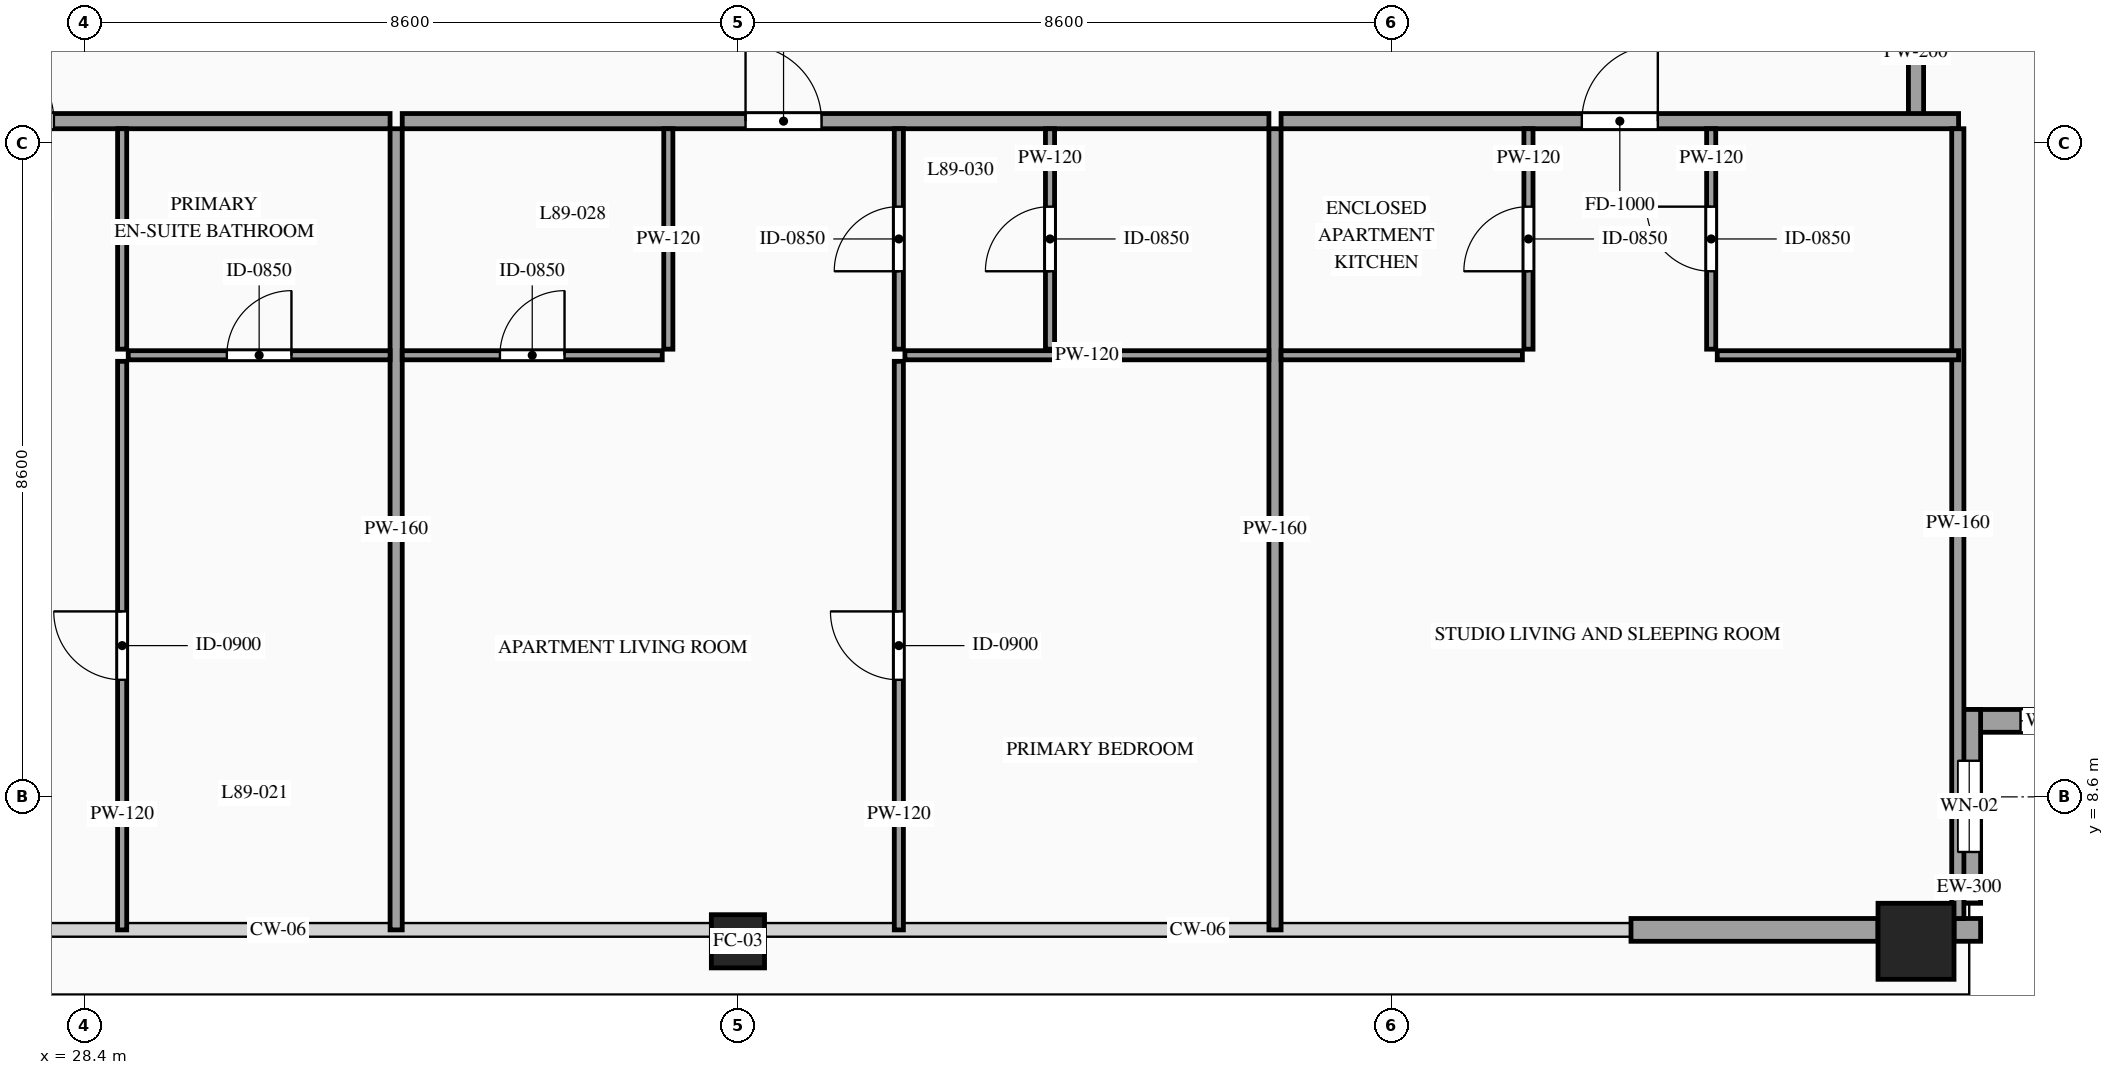
"""IFC4 building model, lengths in metres.
Left out: names, types, materials, properties, quantities, classifications, styles, units other than length and angle.
Written with IfcOpenShell. Run it as: python <this file> out.ifc"""

import sys

from ifc_helpers import new_model, si_unit, direction, frame, frame_2d, origin, origin_2d, place, context, subcontext, project, spatial, rectangle, hollow_rectangle, extrude, source, transform, mapped, element, fill, save


model = new_model("IFC4")
c1 = context("Model", 3, precision=1e-05, world=origin(), true_north=direction((0.0, 1.0)))
c2 = subcontext(c1, "Body", "Model", "MODEL_VIEW")
j1 = project(units=[si_unit("LENGTHUNIT", "METRE"), si_unit("PLANEANGLEUNIT", "RADIAN")], contexts=[c1])
p1 = place(None, origin())
s1 = spatial("IfcSite", under=j1, at=p1, CompositionType="ELEMENT")
p2 = place(p1, origin())
s2 = spatial("IfcBuilding", under=s1, at=p2, CompositionType="ELEMENT")
p3 = place(p2, frame((0.0, 0.0, 332.2)))
s3 = spatial("IfcBuildingStorey", under=s2, at=p3, CompositionType="ELEMENT", Elevation=332.2)
m1 = source(origin(), c2, "Body", "SweptSolid", [
    extrude(hollow_rectangle(XDim=0.7, YDim=0.7, WallThickness=0.032, at=origin_2d()), origin(), (0.0, 0.0, 1.0), 3.5),
])
p4 = place(p3, frame((37.0, 6.7, 0.0), z_axis=(0.0, 0.0, 1.0), x_axis=(1.0, 0.0, 0.0)))
e1 = element("IfcColumn", 1, at=p4, inside=s3, PredefinedType="COLUMN", context=c2, shape_type="MappedRepresentation", body=[
    mapped(m1, transform((0.0, 0.0, 0.0), scale=1.0)),
])
m2 = source(origin(), c2, "Body", "SweptSolid", [
    extrude(hollow_rectangle(XDim=1.0, YDim=1.0, WallThickness=0.048, at=origin_2d()), origin(), (0.0, 0.0, 1.0), 3.5),
])
p5 = place(p3, frame((52.5, 6.7, 0.0), z_axis=(0.0, 0.0, 1.0), x_axis=(1.0, 0.0, 0.0)))
e2 = element("IfcColumn", 2, at=p5, inside=s3, PredefinedType="COLUMN", context=c2, shape_type="MappedRepresentation", body=[
    mapped(m2, transform((0.0, 0.0, 0.0), scale=1.0)),
])
p6 = place(p3, frame((53.05, 9.6, 0.0), z_axis=(0.0, 0.0, 1.0), x_axis=(1.0, 0.0, 0.0)))
e3 = element("IfcWall", 3, at=p6, inside=s3, PredefinedType="SOLIDWALL", context=c2, shape_type="SweptSolid", body=[
    extrude(rectangle(XDim=2.55, YDim=0.3, at=frame_2d((1.275, 0.0))), origin(), (0.0, 0.0, 1.0), 3.28),
])
p7 = place(p6, frame((0.825, 0.0, 0.85)))
e4 = element("IfcOpeningElement", 4, at=p7, cuts=e3, PredefinedType="OPENING", context=c2, shape_type="SweptSolid", body=[
    extrude(rectangle(XDim=0.9, YDim=1.5, at=frame_2d((0.45, 0.75))), frame((0.0, 0.165, 0.0), z_axis=(0.0, -1.0, 0.0), x_axis=(1.0, 0.0, 0.0)), (0.0, 0.0, 1.0), 0.33),
])
p8 = place(p3, frame((53.2, 7.2, 0.0), z_axis=(0.0, 0.0, 1.0), x_axis=(0.0, 1.0, 0.0)))
e5 = element("IfcWall", 5, at=p8, inside=s3, PredefinedType="SOLIDWALL", context=c2, shape_type="SweptSolid", body=[
    extrude(rectangle(XDim=2.55, YDim=0.3, at=frame_2d((1.275, 0.0))), origin(), (0.0, 0.0, 1.0), 3.28),
])
p9 = place(p8, frame((0.675, 0.0, 0.85)))
e6 = element("IfcOpeningElement", 6, at=p9, cuts=e5, PredefinedType="OPENING", context=c2, shape_type="SweptSolid", body=[
    extrude(rectangle(XDim=1.2, YDim=2.1, at=frame_2d((0.6, 1.05))), frame((0.0, 0.165, 0.0), z_axis=(0.0, -1.0, 0.0), x_axis=(1.0, 0.0, 0.0)), (0.0, 0.0, 1.0), 0.33),
])
m3 = source(origin(), c2, "Body", "SweptSolid", [
    extrude(rectangle(XDim=0.35, YDim=0.3, at=frame_2d((0.175, 0.0))), origin(), (0.0, 0.0, 1.0), 3.28),
])
p10 = place(p3, frame((53.0, 6.85, 0.0), z_axis=(0.0, 0.0, 1.0), x_axis=(1.0, 0.0, 0.0)))
e7 = element("IfcWall", 7, at=p10, inside=s3, PredefinedType="SOLIDWALL", context=c2, shape_type="MappedRepresentation", body=[
    mapped(m3, transform((0.0, 0.0, 0.0), scale=1.0)),
])
m4 = source(origin(), c2, "Body", "SweptSolid", [
    extrude(rectangle(XDim=3.25, YDim=0.3, at=frame_2d((1.625, 0.0))), origin(), (0.0, 0.0, 1.0), 2.885),
])
p11 = place(p3, frame((48.75, 6.85, 0.0), z_axis=(0.0, 0.0, 1.0), x_axis=(1.0, 0.0, 0.0)))
e8 = element("IfcWall", 8, at=p11, inside=s3, PredefinedType="SOLIDWALL", context=c2, shape_type="MappedRepresentation", body=[
    mapped(m4, transform((0.0, 0.0, 0.0), scale=1.0)),
])
m5 = source(origin(), c2, "Body", "SweptSolid", [
    extrude(rectangle(XDim=1.7, YDim=0.2, at=frame_2d((0.85, 0.0))), origin(), (0.0, 0.0, 1.0), 3.28),
])
p12 = place(p3, frame((52.5, 17.55, 0.0), z_axis=(0.0, 0.0, 1.0), x_axis=(0.0, 1.0, 0.0)))
e9 = element("IfcWall", 9, at=p12, inside=s3, PredefinedType="PARTITIONING", context=c2, shape_type="MappedRepresentation", body=[
    mapped(m5, transform((0.0, 0.0, 0.0), scale=1.0)),
])
p13 = place(p3, frame((20.94, 17.49, 0.0), z_axis=(0.0, 0.0, 1.0), x_axis=(1.0, 0.0, 0.0)))
e10 = element("IfcWall", 10, at=p13, inside=s3, PredefinedType="PARTITIONING", context=c2, shape_type="SweptSolid", body=[
    extrude(rectangle(XDim=11.483, YDim=0.2, at=frame_2d((5.742, 0.0))), origin(), (0.0, 0.0, 1.0), 3.28),
])
p14 = place(p13, frame((6.06, 0.0, 0.0)))
e11 = element("IfcOpeningElement", 11, at=p14, cuts=e10, PredefinedType="OPENING", context=c2, shape_type="SweptSolid", body=[
    extrude(rectangle(XDim=1.0, YDim=2.2, at=frame_2d((0.5, 1.1))), frame((0.0, 0.115, 0.0), z_axis=(0.0, -1.0, 0.0), x_axis=(1.0, 0.0, 0.0)), (0.0, 0.0, 1.0), 0.23),
])
m6 = source(origin(), c2, "Body", "SweptSolid", [
    extrude(rectangle(XDim=10.54, YDim=0.16, at=frame_2d((5.27, 0.0))), origin(), (0.0, 0.0, 1.0), 3.28),
])
p15 = place(p3, frame((32.503, 6.85, 0.0), z_axis=(0.0, 0.0, 1.0), x_axis=(0.0, 1.0, 0.0)))
e12 = element("IfcWall", 12, at=p15, inside=s3, PredefinedType="PARTITIONING", context=c2, shape_type="MappedRepresentation", body=[
    mapped(m6, transform((0.0, 0.0, 0.0), scale=1.0)),
])
p16 = place(p3, frame((28.978, 14.41, 0.0), z_axis=(0.0, 0.0, 1.0), x_axis=(1.0, 0.0, 0.0)))
e13 = element("IfcWall", 13, at=p16, inside=s3, PredefinedType="PARTITIONING", context=c2, shape_type="SweptSolid", body=[
    extrude(rectangle(XDim=3.445, YDim=0.12, at=frame_2d((1.723, 0.0))), origin(), (0.0, 0.0, 1.0), 3.28),
])
p17 = place(p16, frame((1.298, 0.0, 0.0)))
e14 = element("IfcOpeningElement", 14, at=p17, cuts=e13, PredefinedType="OPENING", context=c2, shape_type="SweptSolid", body=[
    extrude(rectangle(XDim=0.85, YDim=2.1, at=frame_2d((0.425, 1.05))), frame((0.0, 0.075, 0.0), z_axis=(0.0, -1.0, 0.0), x_axis=(1.0, 0.0, 0.0)), (0.0, 0.0, 1.0), 0.15),
])
m7 = source(origin(), c2, "Body", "SweptSolid", [
    extrude(rectangle(XDim=2.9, YDim=0.12, at=frame_2d((1.45, 0.0))), origin(), (0.0, 0.0, 1.0), 3.28),
])
p18 = place(p3, frame((28.898, 14.49, 0.0), z_axis=(0.0, 0.0, 1.0), x_axis=(0.0, 1.0, 0.0)))
e15 = element("IfcWall", 15, at=p18, inside=s3, PredefinedType="PARTITIONING", context=c2, shape_type="MappedRepresentation", body=[
    mapped(m7, transform((0.0, 0.0, 0.0), scale=1.0)),
])
p19 = place(p3, frame((28.898, 6.85, 0.0), z_axis=(0.0, 0.0, 1.0), x_axis=(0.0, 1.0, 0.0)))
e16 = element("IfcWall", 16, at=p19, inside=s3, PredefinedType="PARTITIONING", context=c2, shape_type="SweptSolid", body=[
    extrude(rectangle(XDim=7.48, YDim=0.12, at=frame_2d((3.74, 0.0))), origin(), (0.0, 0.0, 1.0), 3.28),
])
p20 = place(p19, frame((3.29, 0.0, 0.0)))
e17 = element("IfcOpeningElement", 17, at=p20, cuts=e16, PredefinedType="OPENING", context=c2, shape_type="SweptSolid", body=[
    extrude(rectangle(XDim=0.9, YDim=2.15, at=frame_2d((0.45, 1.075))), frame((0.0, 0.075, 0.0), z_axis=(0.0, -1.0, 0.0), x_axis=(1.0, 0.0, 0.0)), (0.0, 0.0, 1.0), 0.15),
])
p21 = place(p3, frame((32.583, 17.49, 0.0), z_axis=(0.0, 0.0, 1.0), x_axis=(1.0, 0.0, 0.0)))
e18 = element("IfcWall", 18, at=p21, inside=s3, PredefinedType="PARTITIONING", context=c2, shape_type="SweptSolid", body=[
    extrude(rectangle(XDim=11.403, YDim=0.2, at=frame_2d((5.702, 0.0))), origin(), (0.0, 0.0, 1.0), 3.28),
])
p22 = place(p21, frame((4.517, 0.0, 0.0)))
e19 = element("IfcOpeningElement", 19, at=p22, cuts=e18, PredefinedType="OPENING", context=c2, shape_type="SweptSolid", body=[
    extrude(rectangle(XDim=1.0, YDim=2.2, at=frame_2d((0.5, 1.1))), frame((0.0, 0.115, 0.0), z_axis=(0.0, -1.0, 0.0), x_axis=(1.0, 0.0, 0.0)), (0.0, 0.0, 1.0), 0.23),
])
p23 = place(p3, frame((44.066, 6.85, 0.0), z_axis=(0.0, 0.0, 1.0), x_axis=(0.0, 1.0, 0.0)))
e20 = element("IfcWall", 20, at=p23, inside=s3, PredefinedType="PARTITIONING", context=c2, shape_type="MappedRepresentation", body=[
    mapped(m6, transform((0.0, 0.0, 0.0), scale=1.0)),
])
p24 = place(p3, frame((32.583, 14.41, 0.0), z_axis=(0.0, 0.0, 1.0), x_axis=(1.0, 0.0, 0.0)))
e21 = element("IfcWall", 21, at=p24, inside=s3, PredefinedType="PARTITIONING", context=c2, shape_type="SweptSolid", body=[
    extrude(rectangle(XDim=3.421, YDim=0.12, at=frame_2d((1.71, 0.0))), origin(), (0.0, 0.0, 1.0), 3.28),
])
p25 = place(p24, frame((1.285, 0.0, 0.0)))
e22 = element("IfcOpeningElement", 22, at=p25, cuts=e21, PredefinedType="OPENING", context=c2, shape_type="SweptSolid", body=[
    extrude(rectangle(XDim=0.85, YDim=2.1, at=frame_2d((0.425, 1.05))), frame((0.0, 0.075, 0.0), z_axis=(0.0, -1.0, 0.0), x_axis=(1.0, 0.0, 0.0)), (0.0, 0.0, 1.0), 0.15),
])
p26 = place(p3, frame((36.084, 14.49, 0.0), z_axis=(0.0, 0.0, 1.0), x_axis=(0.0, 1.0, 0.0)))
e23 = element("IfcWall", 23, at=p26, inside=s3, PredefinedType="PARTITIONING", context=c2, shape_type="MappedRepresentation", body=[
    mapped(m7, transform((0.0, 0.0, 0.0), scale=1.0)),
])
p27 = place(p3, frame((41.106, 14.49, 0.0), z_axis=(0.0, 0.0, 1.0), x_axis=(0.0, 1.0, 0.0)))
e24 = element("IfcWall", 24, at=p27, inside=s3, PredefinedType="PARTITIONING", context=c2, shape_type="SweptSolid", body=[
    extrude(rectangle(XDim=2.9, YDim=0.12, at=frame_2d((1.45, 0.0))), origin(), (0.0, 0.0, 1.0), 3.28),
])
p28 = place(p27, frame((1.025, 0.0, 0.0)))
e25 = element("IfcOpeningElement", 25, at=p28, cuts=e24, PredefinedType="OPENING", context=c2, shape_type="SweptSolid", body=[
    extrude(rectangle(XDim=0.85, YDim=2.1, at=frame_2d((0.425, 1.05))), frame((0.0, 0.075, 0.0), z_axis=(0.0, -1.0, 0.0), x_axis=(1.0, 0.0, 0.0)), (0.0, 0.0, 1.0), 0.15),
])
m8 = source(origin(), c2, "Body", "SweptSolid", [
    extrude(rectangle(XDim=4.789, YDim=0.12, at=frame_2d((2.395, 0.0))), origin(), (0.0, 0.0, 1.0), 3.28),
])
p29 = place(p3, frame((39.197, 14.41, 0.0), z_axis=(0.0, 0.0, 1.0), x_axis=(1.0, 0.0, 0.0)))
e26 = element("IfcWall", 26, at=p29, inside=s3, PredefinedType="PARTITIONING", context=c2, shape_type="MappedRepresentation", body=[
    mapped(m8, transform((0.0, 0.0, 0.0), scale=1.0)),
])
p30 = place(p3, frame((39.117, 6.85, 0.0), z_axis=(0.0, 0.0, 1.0), x_axis=(0.0, 1.0, 0.0)))
e27 = element("IfcWall", 27, at=p30, inside=s3, PredefinedType="PARTITIONING", context=c2, shape_type="SweptSolid", body=[
    extrude(rectangle(XDim=7.48, YDim=0.12, at=frame_2d((3.74, 0.0))), origin(), (0.0, 0.0, 1.0), 3.28),
])
p31 = place(p30, frame((3.29, 0.0, 0.0)))
e28 = element("IfcOpeningElement", 28, at=p31, cuts=e27, PredefinedType="OPENING", context=c2, shape_type="SweptSolid", body=[
    extrude(rectangle(XDim=0.9, YDim=2.15, at=frame_2d((0.45, 1.075))), frame((0.0, 0.075, 0.0), z_axis=(0.0, -1.0, 0.0), x_axis=(1.0, 0.0, 0.0)), (0.0, 0.0, 1.0), 0.15),
])
p32 = place(p3, frame((39.117, 14.49, 0.0), z_axis=(0.0, 0.0, 1.0), x_axis=(0.0, 1.0, 0.0)))
e29 = element("IfcWall", 29, at=p32, inside=s3, PredefinedType="PARTITIONING", context=c2, shape_type="SweptSolid", body=[
    extrude(rectangle(XDim=2.9, YDim=0.12, at=frame_2d((1.45, 0.0))), origin(), (0.0, 0.0, 1.0), 3.28),
])
p33 = place(p32, frame((1.025, 0.0, 0.0)))
e30 = element("IfcOpeningElement", 30, at=p33, cuts=e29, PredefinedType="OPENING", context=c2, shape_type="SweptSolid", body=[
    extrude(rectangle(XDim=0.85, YDim=2.1, at=frame_2d((0.425, 1.05))), frame((0.0, 0.075, 0.0), z_axis=(0.0, -1.0, 0.0), x_axis=(1.0, 0.0, 0.0)), (0.0, 0.0, 1.0), 0.15),
])
p34 = place(p3, frame((44.146, 17.49, 0.0), z_axis=(0.0, 0.0, 1.0), x_axis=(1.0, 0.0, 0.0)))
e31 = element("IfcWall", 31, at=p34, inside=s3, PredefinedType="PARTITIONING", context=c2, shape_type="SweptSolid", body=[
    extrude(rectangle(XDim=8.914, YDim=0.2, at=frame_2d((4.457, 0.0))), origin(), (0.0, 0.0, 1.0), 3.28),
])
p35 = place(p34, frame((3.957, 0.0, 0.0)))
e32 = element("IfcOpeningElement", 32, at=p35, cuts=e31, PredefinedType="OPENING", context=c2, shape_type="SweptSolid", body=[
    extrude(rectangle(XDim=1.0, YDim=2.2, at=frame_2d((0.5, 1.1))), frame((0.0, 0.115, 0.0), z_axis=(0.0, -1.0, 0.0), x_axis=(1.0, 0.0, 0.0)), (0.0, 0.0, 1.0), 0.23),
])
m9 = source(origin(), c2, "Body", "SweptSolid", [
    extrude(rectangle(XDim=10.39, YDim=0.16, at=frame_2d((5.195, 0.0))), origin(), (0.0, 0.0, 1.0), 3.28),
])
p36 = place(p3, frame((53.05, 7.0, 0.0), z_axis=(0.0, 0.0, 1.0), x_axis=(0.0, 1.0, 0.0)))
e33 = element("IfcWall", 33, at=p36, inside=s3, PredefinedType="PARTITIONING", context=c2, shape_type="MappedRepresentation", body=[
    mapped(m9, transform((0.0, 0.0, 0.0), scale=1.0)),
])
m10 = source(origin(), c2, "Body", "SweptSolid", [
    extrude(rectangle(XDim=3.175, YDim=0.12, at=frame_2d((1.587, 0.0))), origin(), (0.0, 0.0, 1.0), 3.28),
])
p37 = place(p3, frame((44.146, 14.41, 0.0), z_axis=(0.0, 0.0, 1.0), x_axis=(1.0, 0.0, 0.0)))
e34 = element("IfcWall", 34, at=p37, inside=s3, PredefinedType="PARTITIONING", context=c2, shape_type="MappedRepresentation", body=[
    mapped(m10, transform((0.0, 0.0, 0.0), scale=1.0)),
])
p38 = place(p3, frame((47.401, 14.49, 0.0), z_axis=(0.0, 0.0, 1.0), x_axis=(0.0, 1.0, 0.0)))
e35 = element("IfcWall", 35, at=p38, inside=s3, PredefinedType="PARTITIONING", context=c2, shape_type="SweptSolid", body=[
    extrude(rectangle(XDim=2.9, YDim=0.12, at=frame_2d((1.45, 0.0))), origin(), (0.0, 0.0, 1.0), 3.28),
])
p39 = place(p38, frame((1.025, 0.0, 0.0)))
e36 = element("IfcOpeningElement", 36, at=p39, cuts=e35, PredefinedType="OPENING", context=c2, shape_type="SweptSolid", body=[
    extrude(rectangle(XDim=0.85, YDim=2.1, at=frame_2d((0.425, 1.05))), frame((0.0, 0.075, 0.0), z_axis=(0.0, -1.0, 0.0), x_axis=(1.0, 0.0, 0.0)), (0.0, 0.0, 1.0), 0.15),
])
p40 = place(p3, frame((49.885, 14.41, 0.0), z_axis=(0.0, 0.0, 1.0), x_axis=(1.0, 0.0, 0.0)))
e37 = element("IfcWall", 37, at=p40, inside=s3, PredefinedType="PARTITIONING", context=c2, shape_type="MappedRepresentation", body=[
    mapped(m10, transform((0.0, 0.0, 0.0), scale=1.0)),
])
p41 = place(p3, frame((49.805, 14.49, 0.0), z_axis=(0.0, 0.0, 1.0), x_axis=(0.0, 1.0, 0.0)))
e38 = element("IfcWall", 38, at=p41, inside=s3, PredefinedType="PARTITIONING", context=c2, shape_type="SweptSolid", body=[
    extrude(rectangle(XDim=2.9, YDim=0.12, at=frame_2d((1.45, 0.0))), origin(), (0.0, 0.0, 1.0), 3.28),
])
p42 = place(p41, frame((1.025, 0.0, 0.0)))
e39 = element("IfcOpeningElement", 39, at=p42, cuts=e38, PredefinedType="OPENING", context=c2, shape_type="SweptSolid", body=[
    extrude(rectangle(XDim=0.85, YDim=2.1, at=frame_2d((0.425, 1.05))), frame((0.0, 0.075, 0.0), z_axis=(0.0, -1.0, 0.0), x_axis=(1.0, 0.0, 0.0)), (0.0, 0.0, 1.0), 0.15),
])
m11 = source(origin(), c2, "Body", "SweptSolid", [
    extrude(rectangle(XDim=0.9, YDim=1.5, at=frame_2d((0.45, 0.75))), frame((0.0, 0.03, 0.0), z_axis=(0.0, -1.0, 0.0), x_axis=(1.0, 0.0, 0.0)), (0.0, 0.0, 1.0), 0.06),
])
p43 = place(p7, origin())
e40 = element("IfcWindow", 40, at=p43, inside=s3, PartitioningType="SINGLE_PANEL", PredefinedType="WINDOW", context=c2, shape_type="MappedRepresentation", body=[
    mapped(m11, transform((0.0, 0.0, 0.0), scale=1.0)),
])
fill(e4, e40)
m12 = source(origin(), c2, "Body", "SweptSolid", [
    extrude(rectangle(XDim=1.2, YDim=2.1, at=frame_2d((0.6, 1.05))), frame((0.0, 0.03, 0.0), z_axis=(0.0, -1.0, 0.0), x_axis=(1.0, 0.0, 0.0)), (0.0, 0.0, 1.0), 0.06),
])
p44 = place(p9, origin())
e41 = element("IfcWindow", 41, at=p44, inside=s3, PartitioningType="SINGLE_PANEL", PredefinedType="WINDOW", context=c2, shape_type="MappedRepresentation", body=[
    mapped(m12, transform((0.0, 0.0, 0.0), scale=1.0)),
])
fill(e6, e41)
m13 = source(origin(), c2, "Body", "SweptSolid", [
    extrude(rectangle(XDim=1.0, YDim=2.2, at=frame_2d((0.5, 1.1))), frame((0.0, 0.025, 0.0), z_axis=(0.0, -1.0, 0.0), x_axis=(1.0, 0.0, 0.0)), (0.0, 0.0, 1.0), 0.05),
])
p45 = place(p14, origin())
e42 = element("IfcDoor", 42, at=p45, inside=s3, OperationType="SINGLE_SWING_LEFT", PredefinedType="DOOR", context=c2, shape_type="MappedRepresentation", body=[
    mapped(m13, transform((0.0, 0.0, 0.0), scale=1.0)),
])
fill(e11, e42)
m14 = source(origin(), c2, "Body", "SweptSolid", [
    extrude(rectangle(XDim=0.85, YDim=2.1, at=frame_2d((0.425, 1.05))), frame((0.0, 0.025, 0.0), z_axis=(0.0, -1.0, 0.0), x_axis=(1.0, 0.0, 0.0)), (0.0, 0.0, 1.0), 0.05),
])
p46 = place(p17, origin())
e43 = element("IfcDoor", 43, at=p46, inside=s3, OperationType="SINGLE_SWING_RIGHT", PredefinedType="DOOR", context=c2, shape_type="MappedRepresentation", body=[
    mapped(m14, transform((0.0, 0.0, 0.0), scale=1.0)),
])
fill(e14, e43)
m15 = source(origin(), c2, "Body", "SweptSolid", [
    extrude(rectangle(XDim=0.9, YDim=2.15, at=frame_2d((0.45, 1.075))), frame((0.0, 0.025, 0.0), z_axis=(0.0, -1.0, 0.0), x_axis=(1.0, 0.0, 0.0)), (0.0, 0.0, 1.0), 0.05),
])
p47 = place(p20, origin())
e44 = element("IfcDoor", 44, at=p47, inside=s3, OperationType="SINGLE_SWING_RIGHT", PredefinedType="DOOR", context=c2, shape_type="MappedRepresentation", body=[
    mapped(m15, transform((0.0, 0.0, 0.0), scale=1.0)),
])
fill(e17, e44)
p48 = place(p22, origin())
e45 = element("IfcDoor", 45, at=p48, inside=s3, OperationType="SINGLE_SWING_LEFT", PredefinedType="DOOR", context=c2, shape_type="MappedRepresentation", body=[
    mapped(m13, transform((0.0, 0.0, 0.0), scale=1.0)),
])
fill(e19, e45)
p49 = place(p25, origin())
e46 = element("IfcDoor", 46, at=p49, inside=s3, OperationType="SINGLE_SWING_RIGHT", PredefinedType="DOOR", context=c2, shape_type="MappedRepresentation", body=[
    mapped(m14, transform((0.0, 0.0, 0.0), scale=1.0)),
])
fill(e22, e46)
p50 = place(p28, origin())
e47 = element("IfcDoor", 47, at=p50, inside=s3, OperationType="SINGLE_SWING_LEFT", PredefinedType="DOOR", context=c2, shape_type="MappedRepresentation", body=[
    mapped(m14, transform((0.0, 0.0, 0.0), scale=1.0)),
])
fill(e25, e47)
p51 = place(p31, origin())
e48 = element("IfcDoor", 48, at=p51, inside=s3, OperationType="SINGLE_SWING_RIGHT", PredefinedType="DOOR", context=c2, shape_type="MappedRepresentation", body=[
    mapped(m15, transform((0.0, 0.0, 0.0), scale=1.0)),
])
fill(e28, e48)
p52 = place(p33, origin())
e49 = element("IfcDoor", 49, at=p52, inside=s3, OperationType="SINGLE_SWING_LEFT", PredefinedType="DOOR", context=c2, shape_type="MappedRepresentation", body=[
    mapped(m14, transform((0.0, 0.0, 0.0), scale=1.0)),
])
fill(e30, e49)
p53 = place(p35, origin())
e50 = element("IfcDoor", 50, at=p53, inside=s3, OperationType="SINGLE_SWING_RIGHT", PredefinedType="DOOR", context=c2, shape_type="MappedRepresentation", body=[
    mapped(m13, transform((0.0, 0.0, 0.0), scale=1.0)),
])
fill(e32, e50)
p54 = place(p39, origin())
e51 = element("IfcDoor", 51, at=p54, inside=s3, OperationType="SINGLE_SWING_LEFT", PredefinedType="DOOR", context=c2, shape_type="MappedRepresentation", body=[
    mapped(m14, transform((0.0, 0.0, 0.0), scale=1.0)),
])
fill(e36, e51)
p55 = place(p42, origin())
e52 = element("IfcDoor", 52, at=p55, inside=s3, OperationType="SINGLE_SWING_RIGHT", PredefinedType="DOOR", context=c2, shape_type="MappedRepresentation", body=[
    mapped(m14, transform((0.0, 0.0, 0.0), scale=1.0)),
])
fill(e39, e52)
save(model, sys.argv[1])
